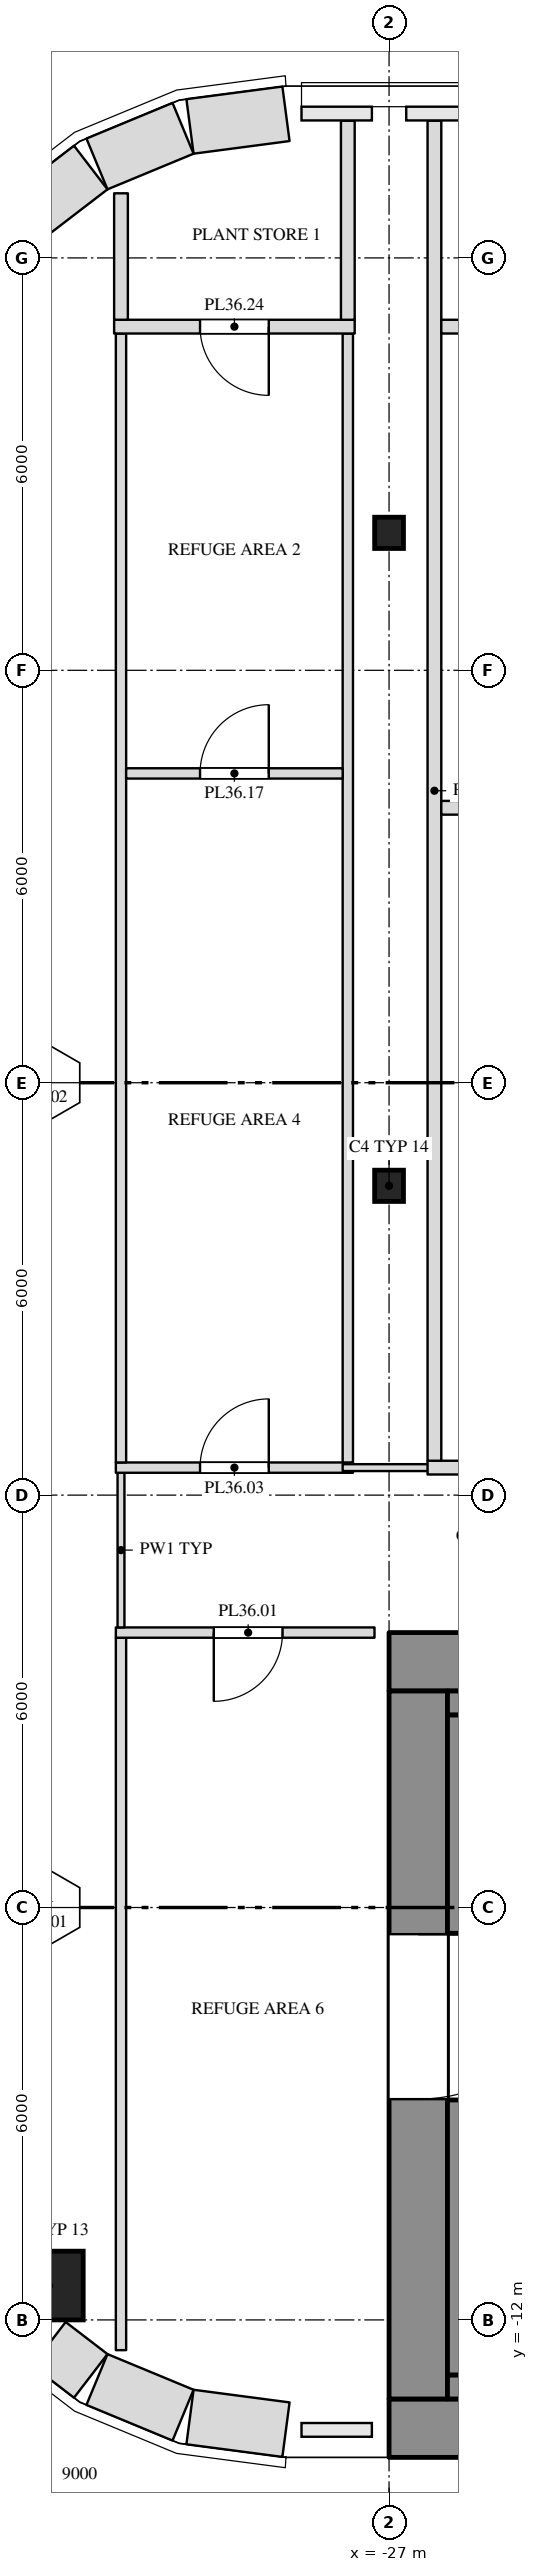
"""IFC4 building model, lengths in metres.
Left out: names, types, materials, properties, quantities, classifications, styles, units other than length and angle.
Written with IfcOpenShell. Run it as: python <this file> out.ifc"""

import sys

from ifc_helpers import new_model, si_unit, direction, frame, frame_2d, origin, origin_2d, place, context, subcontext, project, spatial, rectangle, i_section, extrude, element, fill, save


model = new_model("IFC4")
c1 = context("Model", 3, precision=1e-05, world=origin(), true_north=direction((0.0, 1.0)))
c2 = subcontext(c1, "Body", "Model", "MODEL_VIEW")
j1 = project(units=[si_unit("LENGTHUNIT", "METRE"), si_unit("PLANEANGLEUNIT", "RADIAN")], contexts=[c1])
p1 = place(None, origin())
s1 = spatial("IfcSite", under=j1, at=p1, CompositionType="ELEMENT")
p2 = place(p1, origin())
s2 = spatial("IfcBuilding", under=s1, at=p2, CompositionType="ELEMENT")
p3 = place(p2, frame((0.0, 0.0, 160.5)))
s3 = spatial("IfcBuildingStorey", under=s2, at=p3, CompositionType="ELEMENT", Elevation=160.5)
p4 = place(p3, frame((-31.95, -11.5, 0.0), z_axis=(0.0, 0.0, 1.0), x_axis=(1.0, 0.0, 0.0)))
e1 = element("IfcColumn", 1, at=p4, inside=s3, PredefinedType="COLUMN", context=c2, shape_type="SweptSolid", body=[
    extrude(rectangle(XDim=1.0, YDim=1.0, at=origin_2d()), origin(), (0.0, 0.0, 1.0), 4.0),
])
for number, where, z_axis, x_axis in (
    (2, (-27.0, 4.5, 0.0), (0.0, 0.0, 1.0), (1.0, 0.0, 0.0)),
    (3, (-27.0, 14.0, 0.0), (0.0, 0.0, 1.0), (1.0, 0.0, 0.0)),
):
    element("IfcColumn", number, at=place(p3, frame(where, z_axis=z_axis, x_axis=x_axis)), inside=s3, PredefinedType="COLUMN", context=c2, shape_type="SweptSolid", body=[
        extrude(i_section(OverallWidth=0.419, OverallDepth=0.455, WebThickness=0.042, FlangeThickness=0.068, at=origin_2d()), origin(), (0.0, 0.0, 1.0), 4.0),
    ])
p5 = place(p3, frame((-27.0, -2.425, 0.0), z_axis=(0.0, 0.0, 1.0), x_axis=(1.0, 0.0, 0.0)))
e4 = element("IfcWall", 4, at=p5, inside=s3, PredefinedType="SHEAR", context=c2, shape_type="SweptSolid", body=[
    extrude(rectangle(XDim=54.0, YDim=0.85, at=frame_2d((27.0, 0.0))), origin(), (0.0, 0.0, 1.0), 3.8),
])
p6 = place(p5, frame((15.15, 0.0, 0.0)))
e5 = element("IfcOpeningElement", 5, at=p6, cuts=e4, PredefinedType="OPENING", context=c2, shape_type="SweptSolid", body=[
    extrude(rectangle(XDim=2.4, YDim=2.1, at=frame_2d((1.2, 1.05))), frame((0.0, 0.437, 0.0), z_axis=(0.0, -1.0, 0.0), x_axis=(1.0, 0.0, 0.0)), (0.0, 0.0, 1.0), 0.874),
])
p7 = place(p5, frame((36.45, 0.0, 0.0)))
e6 = element("IfcOpeningElement", 6, at=p7, cuts=e4, PredefinedType="OPENING", context=c2, shape_type="SweptSolid", body=[
    extrude(rectangle(XDim=2.4, YDim=2.1, at=frame_2d((1.2, 1.05))), frame((0.0, 0.437, 0.0), z_axis=(0.0, -1.0, 0.0), x_axis=(1.0, 0.0, 0.0)), (0.0, 0.0, 1.0), 0.874),
])
p8 = place(p3, frame((-27.0, -13.575, 0.0), z_axis=(0.0, 0.0, 1.0), x_axis=(1.0, 0.0, 0.0)))
e7 = element("IfcWall", 7, at=p8, inside=s3, PredefinedType="SHEAR", context=c2, shape_type="SweptSolid", body=[
    extrude(rectangle(XDim=54.0, YDim=0.85, at=frame_2d((27.0, 0.0))), origin(), (0.0, 0.0, 1.0), 3.8),
])
p9 = place(p3, frame((-26.575, -13.15, 0.0), z_axis=(0.0, 0.0, 1.0), x_axis=(0.0, 1.0, 0.0)))
e8 = element("IfcWall", 8, at=p9, inside=s3, PredefinedType="SHEAR", context=c2, shape_type="SweptSolid", body=[
    extrude(rectangle(XDim=10.3, YDim=0.85, at=frame_2d((5.15, 0.0))), origin(), (0.0, 0.0, 1.0), 3.8),
])
p10 = place(p9, frame((4.362, 0.0, 0.0)))
e9 = element("IfcOpeningElement", 9, at=p10, cuts=e8, PredefinedType="OPENING", context=c2, shape_type="SweptSolid", body=[
    extrude(rectangle(XDim=2.4, YDim=2.1, at=frame_2d((1.2, 1.05))), frame((0.0, 0.437, 0.0), z_axis=(0.0, -1.0, 0.0), x_axis=(1.0, 0.0, 0.0)), (0.0, 0.0, 1.0), 0.874),
])
p11 = place(p3, frame((-26.15, -3.025, 0.0), z_axis=(0.0, 0.0, 1.0), x_axis=(1.0, 0.0, 0.0)))
e10 = element("IfcWall", 10, at=p11, inside=s3, PredefinedType="SHEAR", context=c2, shape_type="SweptSolid", body=[
    extrude(rectangle(XDim=14.15, YDim=0.35, at=frame_2d((7.075, 0.0))), origin(), (0.0, 0.0, 1.0), 3.8),
])
p12 = place(p3, frame((-26.15, -12.975, 0.0), z_axis=(0.0, 0.0, 1.0), x_axis=(1.0, 0.0, 0.0)))
e11 = element("IfcWall", 11, at=p12, inside=s3, PredefinedType="SHEAR", context=c2, shape_type="SweptSolid", body=[
    extrude(rectangle(XDim=52.3, YDim=0.35, at=frame_2d((26.15, 0.0))), origin(), (0.0, 0.0, 1.0), 3.8),
])
p13 = place(p3, frame((-25.975, -12.8, 0.0), z_axis=(0.0, 0.0, 1.0), x_axis=(0.0, 1.0, 0.0)))
e12 = element("IfcWall", 12, at=p13, inside=s3, PredefinedType="SHEAR", context=c2, shape_type="SweptSolid", body=[
    extrude(rectangle(XDim=4.0, YDim=0.35, at=frame_2d((2.0, 0.0))), origin(), (0.0, 0.0, 1.0), 3.8),
])
p14 = place(p3, frame((-25.975, -6.375, 0.0), z_axis=(0.0, 0.0, 1.0), x_axis=(0.0, 1.0, 0.0)))
e13 = element("IfcWall", 13, at=p14, inside=s3, PredefinedType="SHEAR", context=c2, shape_type="SweptSolid", body=[
    extrude(rectangle(XDim=3.175, YDim=0.35, at=frame_2d((1.587, 0.0))), origin(), (0.0, 0.0, 1.0), 3.8),
])
p15 = place(p3, frame((-30.9, -12.44, 0.0), z_axis=(0.0, 0.0, 1.0), x_axis=(0.0, 1.0, 0.0)))
e14 = element("IfcWall", 14, at=p15, inside=s3, PredefinedType="PARTITIONING", context=c2, shape_type="SweptSolid", body=[
    extrude(rectangle(XDim=10.365, YDim=0.15, at=frame_2d((5.183, 0.0))), origin(), (0.0, 0.0, 1.0), 3.8),
])
p16 = place(p3, frame((-30.975, -2.0, 0.0), z_axis=(0.0, 0.0, 1.0), x_axis=(1.0, 0.0, 0.0)))
e15 = element("IfcWall", 15, at=p16, inside=s3, PredefinedType="PARTITIONING", context=c2, shape_type="SweptSolid", body=[
    extrude(rectangle(XDim=3.763, YDim=0.15, at=frame_2d((1.882, 0.0))), origin(), (0.0, 0.0, 1.0), 3.8),
])
p17 = place(p16, frame((1.425, 0.0, 0.0)))
e16 = element("IfcOpeningElement", 16, at=p17, cuts=e15, PredefinedType="OPENING", context=c2, shape_type="SweptSolid", body=[
    extrude(rectangle(XDim=1.0, YDim=2.1, at=frame_2d((0.5, 1.05))), frame((0.0, 0.087, 0.0), z_axis=(0.0, -1.0, 0.0), x_axis=(1.0, 0.0, 0.0)), (0.0, 0.0, 1.0), 0.174),
])
p18 = place(p3, frame((-30.9, -1.925, 0.0), z_axis=(0.0, 0.0, 1.0), x_axis=(0.0, 1.0, 0.0)))
e17 = element("IfcWall", 17, at=p18, inside=s3, PredefinedType="PARTITIONING", context=c2, shape_type="SweptSolid", body=[
    extrude(rectangle(XDim=2.25, YDim=0.1, at=frame_2d((1.125, 0.0))), origin(), (0.0, 0.0, 1.0), 3.8),
])
p19 = place(p3, frame((-30.975, 0.4, 0.0), z_axis=(0.0, 0.0, 1.0), x_axis=(1.0, 0.0, 0.0)))
e18 = element("IfcWall", 18, at=p19, inside=s3, PredefinedType="PARTITIONING", context=c2, shape_type="SweptSolid", body=[
    extrude(rectangle(XDim=3.45, YDim=0.15, at=frame_2d((1.725, 0.0))), origin(), (0.0, 0.0, 1.0), 3.8),
])
p20 = place(p19, frame((1.225, 0.0, 0.0)))
e19 = element("IfcOpeningElement", 19, at=p20, cuts=e18, PredefinedType="OPENING", context=c2, shape_type="SweptSolid", body=[
    extrude(rectangle(XDim=1.0, YDim=2.1, at=frame_2d((0.5, 1.05))), frame((0.0, 0.087, 0.0), z_axis=(0.0, -1.0, 0.0), x_axis=(1.0, 0.0, 0.0)), (0.0, 0.0, 1.0), 0.174),
])
p21 = place(p3, frame((-30.9, 0.475, 0.0), z_axis=(0.0, 0.0, 1.0), x_axis=(0.0, 1.0, 0.0)))
e20 = element("IfcWall", 20, at=p21, inside=s3, PredefinedType="PARTITIONING", context=c2, shape_type="SweptSolid", body=[
    extrude(rectangle(XDim=16.425, YDim=0.15, at=frame_2d((8.212, 0.0))), origin(), (0.0, 0.0, 1.0), 3.8),
])
p22 = place(p3, frame((-27.675, 0.4, 0.0), z_axis=(0.0, 0.0, 1.0), x_axis=(1.0, 0.0, 0.0)))
e21 = element("IfcWall", 21, at=p22, inside=s3, PredefinedType="PARTITIONING", context=c2, shape_type="SweptSolid", body=[
    extrude(rectangle(XDim=1.435, YDim=0.1, at=frame_2d((0.718, 0.0))), origin(), (0.0, 0.0, 1.0), 3.8),
])
p23 = place(p3, frame((-27.6, 0.475, 0.0), z_axis=(0.0, 0.0, 1.0), x_axis=(0.0, 1.0, 0.0)))
e22 = element("IfcWall", 22, at=p23, inside=s3, PredefinedType="PARTITIONING", context=c2, shape_type="SweptSolid", body=[
    extrude(rectangle(XDim=16.425, YDim=0.15, at=frame_2d((8.212, 0.0))), origin(), (0.0, 0.0, 1.0), 3.8),
])
p24 = place(p3, frame((-26.44, 0.4, 0.0), z_axis=(0.0, 0.0, 1.0), x_axis=(1.0, 0.0, 0.0)))
e23 = element("IfcWall", 23, at=p24, inside=s3, PredefinedType="PARTITIONING", context=c2, shape_type="SweptSolid", body=[
    extrude(rectangle(XDim=7.88, YDim=0.2, at=frame_2d((3.94, 0.0))), origin(), (0.0, 0.0, 1.0), 3.8),
])
p25 = place(p24, frame((3.05, 0.0, 0.0)))
e24 = element("IfcOpeningElement", 24, at=p25, cuts=e23, PredefinedType="OPENING", context=c2, shape_type="SweptSolid", body=[
    extrude(rectangle(XDim=1.8, YDim=2.1, at=frame_2d((0.9, 1.05))), frame((0.0, 0.112, 0.0), z_axis=(0.0, -1.0, 0.0), x_axis=(1.0, 0.0, 0.0)), (0.0, 0.0, 1.0), 0.224),
])
p26 = place(p3, frame((-26.34, 0.5, 0.0), z_axis=(0.0, 0.0, 1.0), x_axis=(0.0, 1.0, 0.0)))
e25 = element("IfcWall", 25, at=p26, inside=s3, PredefinedType="PARTITIONING", context=c2, shape_type="SweptSolid", body=[
    extrude(rectangle(XDim=19.496, YDim=0.2, at=frame_2d((9.748, 0.0))), origin(), (0.0, 0.0, 1.0), 3.8),
])
p27 = place(p3, frame((-26.24, 10.0, 0.0), z_axis=(0.0, 0.0, 1.0), x_axis=(1.0, 0.0, 0.0)))
e26 = element("IfcWall", 26, at=p27, inside=s3, PredefinedType="PARTITIONING", context=c2, shape_type="SweptSolid", body=[
    extrude(rectangle(XDim=7.48, YDim=0.2, at=frame_2d((3.74, 0.0))), origin(), (0.0, 0.0, 1.0), 3.8),
])
p28 = place(p27, frame((3.25, 0.0, 0.0)))
e27 = element("IfcOpeningElement", 27, at=p28, cuts=e26, PredefinedType="OPENING", context=c2, shape_type="SweptSolid", body=[
    extrude(rectangle(XDim=1.0, YDim=2.1, at=frame_2d((0.5, 1.05))), frame((0.0, 0.112, 0.0), z_axis=(0.0, -1.0, 0.0), x_axis=(1.0, 0.0, 0.0)), (0.0, 0.0, 1.0), 0.224),
])
p29 = place(p3, frame((-30.825, 10.5, 0.0), z_axis=(0.0, 0.0, 1.0), x_axis=(1.0, 0.0, 0.0)))
e28 = element("IfcWall", 28, at=p29, inside=s3, PredefinedType="PARTITIONING", context=c2, shape_type="SweptSolid", body=[
    extrude(rectangle(XDim=3.15, YDim=0.15, at=frame_2d((1.575, 0.0))), origin(), (0.0, 0.0, 1.0), 3.8),
])
p30 = place(p29, frame((1.075, 0.0, 0.0)))
e29 = element("IfcOpeningElement", 29, at=p30, cuts=e28, PredefinedType="OPENING", context=c2, shape_type="SweptSolid", body=[
    extrude(rectangle(XDim=1.0, YDim=2.1, at=frame_2d((0.5, 1.05))), frame((0.0, 0.087, 0.0), z_axis=(0.0, -1.0, 0.0), x_axis=(1.0, 0.0, 0.0)), (0.0, 0.0, 1.0), 0.174),
])
p31 = place(p3, frame((-31.0, 17.0, 0.0), z_axis=(0.0, 0.0, 1.0), x_axis=(1.0, 0.0, 0.0)))
e30 = element("IfcWall", 30, at=p31, inside=s3, PredefinedType="PARTITIONING", context=c2, shape_type="SweptSolid", body=[
    extrude(rectangle(XDim=3.5, YDim=0.2, at=frame_2d((1.75, 0.0))), origin(), (0.0, 0.0, 1.0), 3.8),
])
p32 = place(p31, frame((1.25, 0.0, 0.0)))
e31 = element("IfcOpeningElement", 31, at=p32, cuts=e30, PredefinedType="OPENING", context=c2, shape_type="SweptSolid", body=[
    extrude(rectangle(XDim=1.0, YDim=2.1, at=frame_2d((0.5, 1.05))), frame((0.0, 0.112, 0.0), z_axis=(0.0, -1.0, 0.0), x_axis=(1.0, 0.0, 0.0)), (0.0, 0.0, 1.0), 0.224),
])
p33 = place(p3, frame((-30.9, 17.1, 0.0), z_axis=(0.0, 0.0, 1.0), x_axis=(0.0, 1.0, 0.0)))
e32 = element("IfcWall", 32, at=p33, inside=s3, PredefinedType="PARTITIONING", context=c2, shape_type="SweptSolid", body=[
    extrude(rectangle(XDim=1.84, YDim=0.2, at=frame_2d((0.92, 0.0))), origin(), (0.0, 0.0, 1.0), 3.8),
])
p34 = place(p3, frame((-27.6, 17.1, 0.0), z_axis=(0.0, 0.0, 1.0), x_axis=(0.0, 1.0, 0.0)))
e33 = element("IfcWall", 33, at=p34, inside=s3, PredefinedType="PARTITIONING", context=c2, shape_type="SweptSolid", body=[
    extrude(rectangle(XDim=2.896, YDim=0.2, at=frame_2d((1.448, 0.0))), origin(), (0.0, 0.0, 1.0), 3.8),
])
p35 = place(p3, frame((-26.24, 17.0, 0.0), z_axis=(0.0, 0.0, 1.0), x_axis=(1.0, 0.0, 0.0)))
e34 = element("IfcWall", 34, at=p35, inside=s3, PredefinedType="PARTITIONING", context=c2, shape_type="SweptSolid", body=[
    extrude(rectangle(XDim=7.48, YDim=0.2, at=frame_2d((3.74, 0.0))), origin(), (0.0, 0.0, 1.0), 3.8),
])
p36 = place(p35, frame((3.25, 0.0, 0.0)))
e35 = element("IfcOpeningElement", 35, at=p36, cuts=e34, PredefinedType="OPENING", context=c2, shape_type="SweptSolid", body=[
    extrude(rectangle(XDim=1.0, YDim=2.1, at=frame_2d((0.5, 1.05))), frame((0.0, 0.112, 0.0), z_axis=(0.0, -1.0, 0.0), x_axis=(1.0, 0.0, 0.0)), (0.0, 0.0, 1.0), 0.224),
])
p37 = place(p3, frame((-28.5, 20.097, 0.0), z_axis=(0.0, 0.0, 1.0), x_axis=(-0.99144603414, -0.130517283865, 0.0)))
e36 = element("IfcWall", 36, at=p37, inside=s3, PredefinedType="SOLIDWALL", context=c2, shape_type="SweptSolid", body=[
    extrude(rectangle(XDim=1.408, YDim=0.8, at=frame_2d((0.704, 0.0))), origin(), (0.0, 0.0, 1.0), 3.8),
])
p38 = place(p3, frame((-29.997, 19.886, 0.0), z_axis=(0.0, 0.0, 1.0), x_axis=(-0.923847774587, -0.38276009378, 0.0)))
e37 = element("IfcWall", 37, at=p38, inside=s3, PredefinedType="SOLIDWALL", context=c2, shape_type="SweptSolid", body=[
    extrude(rectangle(XDim=1.355, YDim=0.8, at=frame_2d((0.678, 0.0))), origin(), (0.0, 0.0, 1.0), 3.8),
])
p39 = place(p3, frame((-31.34, 19.315, 0.0), z_axis=(0.0, 0.0, 1.0), x_axis=(-0.793272915452, -0.608866226366, 0.0)))
e38 = element("IfcWall", 38, at=p39, inside=s3, PredefinedType="SOLIDWALL", context=c2, shape_type="SweptSolid", body=[
    extrude(rectangle(XDim=1.356, YDim=0.8, at=frame_2d((0.678, 0.0))), origin(), (0.0, 0.0, 1.0), 3.8),
])
p40 = place(p3, frame((-31.948, -12.348, 0.0), z_axis=(0.0, 0.0, 1.0), x_axis=(0.793380840338, -0.608725588574, 0.0)))
e39 = element("IfcWall", 39, at=p40, inside=s3, PredefinedType="SOLIDWALL", context=c2, shape_type="SweptSolid", body=[
    extrude(rectangle(XDim=0.767, YDim=0.8, at=frame_2d((0.383, 0.0))), origin(), (0.0, 0.0, 1.0), 3.8),
])
p41 = place(p3, frame((-31.25, -12.867, 0.0), z_axis=(0.0, 0.0, 1.0), x_axis=(0.923847774587, -0.38276009378, 0.0)))
e40 = element("IfcWall", 40, at=p41, inside=s3, PredefinedType="SOLIDWALL", context=c2, shape_type="SweptSolid", body=[
    extrude(rectangle(XDim=1.355, YDim=0.8, at=frame_2d((0.678, 0.0))), origin(), (0.0, 0.0, 1.0), 3.8),
])
p42 = place(p3, frame((-29.896, -13.413, 0.0), z_axis=(0.0, 0.0, 1.0), x_axis=(0.99144603414, -0.130517283865, 0.0)))
e41 = element("IfcWall", 41, at=p42, inside=s3, PredefinedType="SOLIDWALL", context=c2, shape_type="SweptSolid", body=[
    extrude(rectangle(XDim=1.408, YDim=0.8, at=frame_2d((0.704, 0.0))), origin(), (0.0, 0.0, 1.0), 3.8),
])
p43 = place(p17, origin())
e42 = element("IfcDoor", 42, at=p43, inside=s3, OperationType="SINGLE_SWING_RIGHT", PredefinedType="DOOR", context=c2, shape_type="SweptSolid", body=[
    extrude(rectangle(XDim=1.0, YDim=2.1, at=frame_2d((0.5, 1.05))), frame((0.0, 0.025, 0.0), z_axis=(0.0, -1.0, 0.0), x_axis=(1.0, 0.0, 0.0)), (0.0, 0.0, 1.0), 0.05),
])
fill(e16, e42)
p44 = place(p20, origin())
e43 = element("IfcDoor", 43, at=p44, inside=s3, OperationType="SINGLE_SWING_RIGHT", PredefinedType="DOOR", context=c2, shape_type="SweptSolid", body=[
    extrude(rectangle(XDim=1.0, YDim=2.1, at=frame_2d((0.5, 1.05))), frame((0.0, 0.025, 0.0), z_axis=(0.0, -1.0, 0.0), x_axis=(1.0, 0.0, 0.0)), (0.0, 0.0, 1.0), 0.05),
])
fill(e19, e43)
p45 = place(p30, origin())
e44 = element("IfcDoor", 44, at=p45, inside=s3, OperationType="SINGLE_SWING_RIGHT", PredefinedType="DOOR", context=c2, shape_type="SweptSolid", body=[
    extrude(rectangle(XDim=1.0, YDim=2.1, at=frame_2d((0.5, 1.05))), frame((0.0, 0.025, 0.0), z_axis=(0.0, -1.0, 0.0), x_axis=(1.0, 0.0, 0.0)), (0.0, 0.0, 1.0), 0.05),
])
fill(e29, e44)
p46 = place(p32, origin())
e45 = element("IfcDoor", 45, at=p46, inside=s3, OperationType="SINGLE_SWING_LEFT", PredefinedType="DOOR", context=c2, shape_type="SweptSolid", body=[
    extrude(rectangle(XDim=1.0, YDim=2.1, at=frame_2d((0.5, 1.05))), frame((0.0, 0.025, 0.0), z_axis=(0.0, -1.0, 0.0), x_axis=(1.0, 0.0, 0.0)), (0.0, 0.0, 1.0), 0.05),
])
fill(e31, e45)
p47 = place(p10, origin())
e46 = element("IfcDoor", 46, at=p47, inside=s3, OperationType="DOUBLE_DOOR_SINGLE_SWING", PredefinedType="DOOR", context=c2, shape_type="SweptSolid", body=[
    extrude(rectangle(XDim=2.4, YDim=2.1, at=frame_2d((1.2, 1.05))), frame((0.0, 0.025, 0.0), z_axis=(0.0, -1.0, 0.0), x_axis=(1.0, 0.0, 0.0)), (0.0, 0.0, 1.0), 0.05),
])
fill(e9, e46)
save(model, sys.argv[1])
